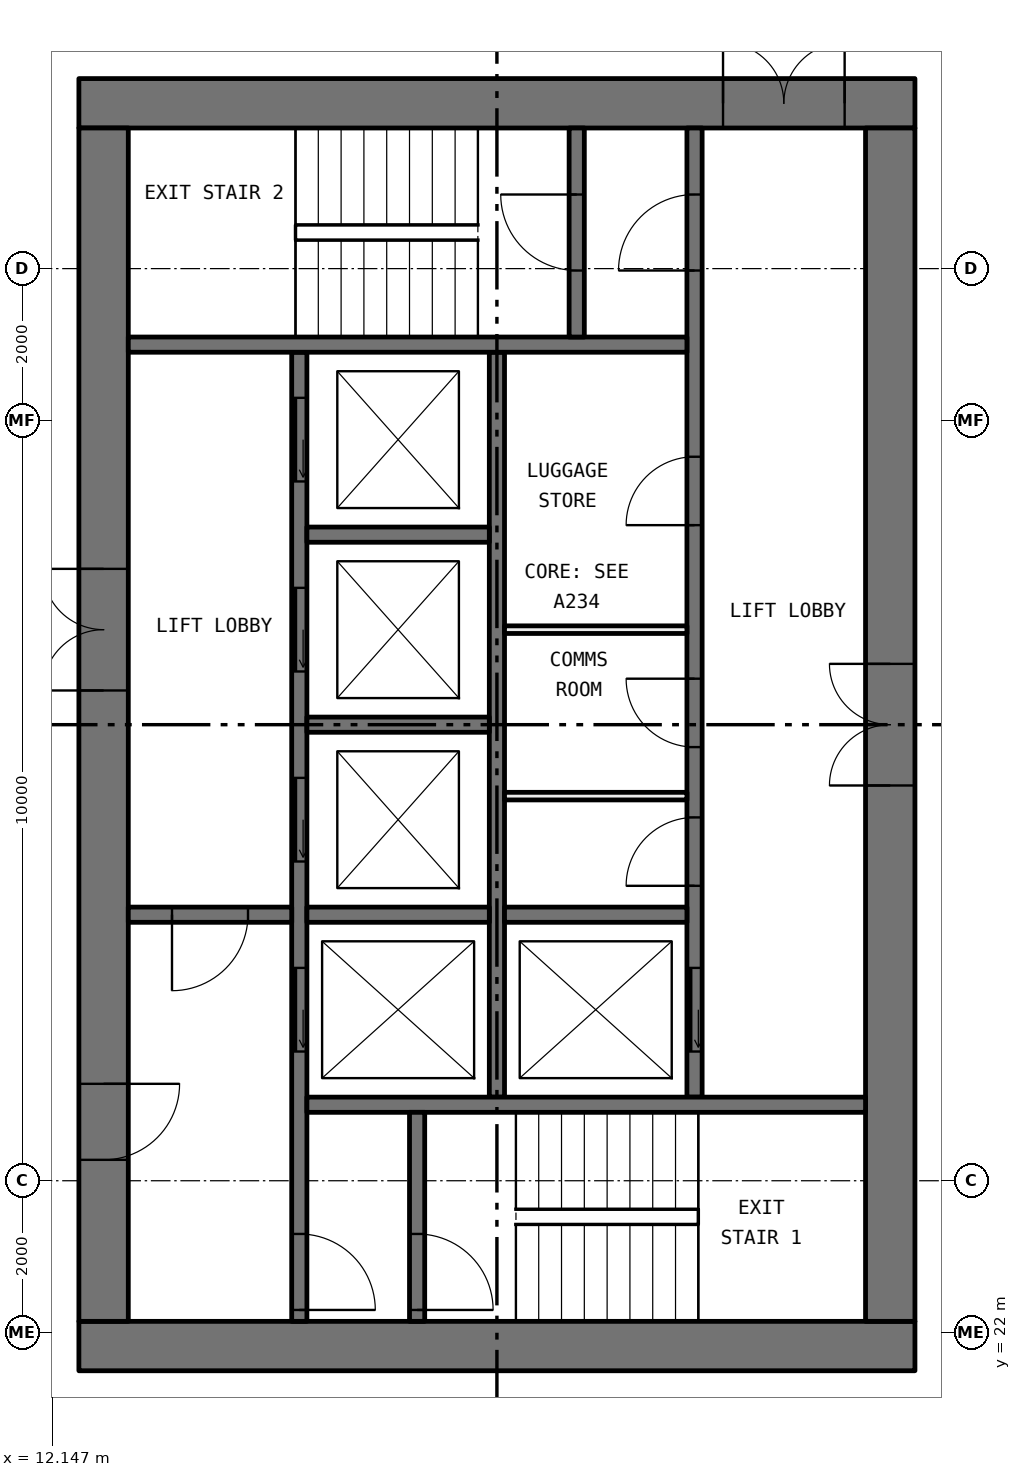
"""IFC4 building model, lengths in metres.
Left out: names, types, materials, properties, quantities, classifications, styles, units other than length and angle.
Written with IfcOpenShell. Run it as: python <this file> out.ifc"""

import sys

from ifc_helpers import new_model, si_unit, direction, frame, frame_2d, origin, place, context, subcontext, project, spatial, rectangle, extrude, element, fill, save


model = new_model("IFC4")
c1 = context("Model", 3, precision=1e-05, world=origin(), true_north=direction((0.0, 1.0)))
c2 = subcontext(c1, "Body", "Model", "MODEL_VIEW")
j1 = project(units=[si_unit("LENGTHUNIT", "METRE"), si_unit("PLANEANGLEUNIT", "RADIAN")], contexts=[c1])
p1 = place(None, origin())
s1 = spatial("IfcSite", under=j1, at=p1, CompositionType="ELEMENT")
p2 = place(p1, origin())
s2 = spatial("IfcBuilding", under=s1, at=p2, CompositionType="ELEMENT")
p3 = place(p2, frame((0.0, 0.0, 127.65)))
s3 = spatial("IfcBuildingStorey", under=s2, at=p3, CompositionType="ELEMENT", Elevation=127.65)
p4 = place(p3, frame((12.5, 21.825, 0.0), z_axis=(0.0, 0.0, 1.0), x_axis=(1.0, 0.0, 0.0)))
e1 = element("IfcWall", 1, at=p4, inside=s3, PredefinedType="SHEAR", context=c2, shape_type="SweptSolid", body=[
    extrude(rectangle(XDim=11.0, YDim=0.65, at=frame_2d((5.5, 0.0))), origin(), (0.0, 0.0, 1.0), 3.05),
])
p5 = place(p3, frame((12.5, 38.175, 0.0), z_axis=(0.0, 0.0, 1.0), x_axis=(1.0, 0.0, 0.0)))
e2 = element("IfcWall", 2, at=p5, inside=s3, PredefinedType="SHEAR", context=c2, shape_type="SweptSolid", body=[
    extrude(rectangle(XDim=11.0, YDim=0.65, at=frame_2d((5.5, 0.0))), origin(), (0.0, 0.0, 1.0), 3.05),
])
p6 = place(p5, frame((8.475, 0.0, 0.0)))
e3 = element("IfcOpeningElement", 3, at=p6, cuts=e2, PredefinedType="OPENING", context=c2, shape_type="SweptSolid", body=[
    extrude(rectangle(XDim=1.6, YDim=2.1, at=frame_2d((0.8, 1.05))), frame((0.0, 0.335, 0.0), z_axis=(0.0, -1.0, 0.0), x_axis=(1.0, 0.0, 0.0)), (0.0, 0.0, 1.0), 0.67),
])
p7 = place(p3, frame((12.825, 22.15, 0.0), z_axis=(0.0, 0.0, 1.0), x_axis=(0.0, 1.0, 0.0)))
e4 = element("IfcWall", 4, at=p7, inside=s3, PredefinedType="SHEAR", context=c2, shape_type="SweptSolid", body=[
    extrude(rectangle(XDim=15.7, YDim=0.65, at=frame_2d((7.85, 0.0))), origin(), (0.0, 0.0, 1.0), 3.05),
])
p8 = place(p7, frame((8.3, 0.0, 0.0)))
e5 = element("IfcOpeningElement", 5, at=p8, cuts=e4, PredefinedType="OPENING", context=c2, shape_type="SweptSolid", body=[
    extrude(rectangle(XDim=1.6, YDim=2.1, at=frame_2d((0.8, 1.05))), frame((0.0, 0.335, 0.0), z_axis=(0.0, -1.0, 0.0), x_axis=(1.0, 0.0, 0.0)), (0.0, 0.0, 1.0), 0.67),
])
p9 = place(p7, frame((2.125, 0.0, 0.0)))
e6 = element("IfcOpeningElement", 6, at=p9, cuts=e4, PredefinedType="OPENING", context=c2, shape_type="SweptSolid", body=[
    extrude(rectangle(XDim=1.0, YDim=2.1, at=frame_2d((0.5, 1.05))), frame((0.0, 0.335, 0.0), z_axis=(0.0, -1.0, 0.0), x_axis=(1.0, 0.0, 0.0)), (0.0, 0.0, 1.0), 0.67),
])
p10 = place(p3, frame((23.175, 22.15, 0.0), z_axis=(0.0, 0.0, 1.0), x_axis=(0.0, 1.0, 0.0)))
e7 = element("IfcWall", 7, at=p10, inside=s3, PredefinedType="SHEAR", context=c2, shape_type="SweptSolid", body=[
    extrude(rectangle(XDim=15.7, YDim=0.65, at=frame_2d((7.85, 0.0))), origin(), (0.0, 0.0, 1.0), 3.05),
])
p11 = place(p10, frame((7.05, 0.0, 0.0)))
e8 = element("IfcOpeningElement", 8, at=p11, cuts=e7, PredefinedType="OPENING", context=c2, shape_type="SweptSolid", body=[
    extrude(rectangle(XDim=1.6, YDim=2.1, at=frame_2d((0.8, 1.05))), frame((0.0, 0.335, 0.0), z_axis=(0.0, -1.0, 0.0), x_axis=(1.0, 0.0, 0.0)), (0.0, 0.0, 1.0), 0.67),
])
p12 = place(p3, frame((15.4, 22.15, 0.0), z_axis=(0.0, 0.0, 1.0), x_axis=(0.0, 1.0, 0.0)))
e9 = element("IfcWall", 9, at=p12, inside=s3, PredefinedType="SOLIDWALL", context=c2, shape_type="SweptSolid", body=[
    extrude(rectangle(XDim=12.75, YDim=0.2, at=frame_2d((6.375, 0.0))), origin(), (0.0, 0.0, 1.0), 3.05),
])
p13 = place(p12, frame((3.55, 0.0, 0.0)))
e10 = element("IfcOpeningElement", 10, at=p13, cuts=e9, PredefinedType="OPENING", context=c2, shape_type="SweptSolid", body=[
    extrude(rectangle(XDim=1.1, YDim=2.1, at=frame_2d((0.55, 1.05))), frame((0.0, 0.11, 0.0), z_axis=(0.0, -1.0, 0.0), x_axis=(1.0, 0.0, 0.0)), (0.0, 0.0, 1.0), 0.22),
])
p14 = place(p12, frame((6.05, 0.0, 0.0)))
e11 = element("IfcOpeningElement", 11, at=p14, cuts=e9, PredefinedType="OPENING", context=c2, shape_type="SweptSolid", body=[
    extrude(rectangle(XDim=1.1, YDim=2.1, at=frame_2d((0.55, 1.05))), frame((0.0, 0.11, 0.0), z_axis=(0.0, -1.0, 0.0), x_axis=(1.0, 0.0, 0.0)), (0.0, 0.0, 1.0), 0.22),
])
p15 = place(p12, frame((8.55, 0.0, 0.0)))
e12 = element("IfcOpeningElement", 12, at=p15, cuts=e9, PredefinedType="OPENING", context=c2, shape_type="SweptSolid", body=[
    extrude(rectangle(XDim=1.1, YDim=2.1, at=frame_2d((0.55, 1.05))), frame((0.0, 0.11, 0.0), z_axis=(0.0, -1.0, 0.0), x_axis=(1.0, 0.0, 0.0)), (0.0, 0.0, 1.0), 0.22),
])
p16 = place(p12, frame((11.05, 0.0, 0.0)))
e13 = element("IfcOpeningElement", 13, at=p16, cuts=e9, PredefinedType="OPENING", context=c2, shape_type="SweptSolid", body=[
    extrude(rectangle(XDim=1.1, YDim=2.1, at=frame_2d((0.55, 1.05))), frame((0.0, 0.11, 0.0), z_axis=(0.0, -1.0, 0.0), x_axis=(1.0, 0.0, 0.0)), (0.0, 0.0, 1.0), 0.22),
])
p17 = place(p12, frame((0.15, 0.0, 0.0)))
e14 = element("IfcOpeningElement", 14, at=p17, cuts=e9, PredefinedType="OPENING", context=c2, shape_type="SweptSolid", body=[
    extrude(rectangle(XDim=1.0, YDim=2.1, at=frame_2d((0.5, 1.05))), frame((0.0, 0.11, 0.0), z_axis=(0.0, -1.0, 0.0), x_axis=(1.0, 0.0, 0.0)), (0.0, 0.0, 1.0), 0.22),
])
p18 = place(p3, frame((20.6, 25.1, 0.0), z_axis=(0.0, 0.0, 1.0), x_axis=(0.0, 1.0, 0.0)))
e15 = element("IfcWall", 15, at=p18, inside=s3, PredefinedType="SOLIDWALL", context=c2, shape_type="SweptSolid", body=[
    extrude(rectangle(XDim=12.75, YDim=0.2, at=frame_2d((6.375, 0.0))), origin(), (0.0, 0.0, 1.0), 3.05),
])
p19 = place(p18, frame((0.6, 0.0, 0.0)))
e16 = element("IfcOpeningElement", 16, at=p19, cuts=e15, PredefinedType="OPENING", context=c2, shape_type="SweptSolid", body=[
    extrude(rectangle(XDim=1.1, YDim=2.1, at=frame_2d((0.55, 1.05))), frame((0.0, 0.11, 0.0), z_axis=(0.0, -1.0, 0.0), x_axis=(1.0, 0.0, 0.0)), (0.0, 0.0, 1.0), 0.22),
])
p20 = place(p18, frame((10.875, 0.0, 0.0)))
e17 = element("IfcOpeningElement", 17, at=p20, cuts=e15, PredefinedType="OPENING", context=c2, shape_type="SweptSolid", body=[
    extrude(rectangle(XDim=1.0, YDim=2.1, at=frame_2d((0.5, 1.05))), frame((0.0, 0.11, 0.0), z_axis=(0.0, -1.0, 0.0), x_axis=(1.0, 0.0, 0.0)), (0.0, 0.0, 1.0), 0.22),
])
p21 = place(p18, frame((2.78, 0.0, 0.0)))
e18 = element("IfcOpeningElement", 18, at=p21, cuts=e15, PredefinedType="OPENING", context=c2, shape_type="SweptSolid", body=[
    extrude(rectangle(XDim=0.9, YDim=2.1, at=frame_2d((0.45, 1.05))), frame((0.0, 0.11, 0.0), z_axis=(0.0, -1.0, 0.0), x_axis=(1.0, 0.0, 0.0)), (0.0, 0.0, 1.0), 0.22),
])
p22 = place(p18, frame((4.605, 0.0, 0.0)))
e19 = element("IfcOpeningElement", 19, at=p22, cuts=e15, PredefinedType="OPENING", context=c2, shape_type="SweptSolid", body=[
    extrude(rectangle(XDim=0.9, YDim=2.1, at=frame_2d((0.45, 1.05))), frame((0.0, 0.11, 0.0), z_axis=(0.0, -1.0, 0.0), x_axis=(1.0, 0.0, 0.0)), (0.0, 0.0, 1.0), 0.22),
])
p23 = place(p18, frame((7.525, 0.0, 0.0)))
e20 = element("IfcOpeningElement", 20, at=p23, cuts=e15, PredefinedType="OPENING", context=c2, shape_type="SweptSolid", body=[
    extrude(rectangle(XDim=0.9, YDim=2.1, at=frame_2d((0.45, 1.05))), frame((0.0, 0.11, 0.0), z_axis=(0.0, -1.0, 0.0), x_axis=(1.0, 0.0, 0.0)), (0.0, 0.0, 1.0), 0.22),
])
p24 = place(p3, frame((18.0, 25.1, 0.0), z_axis=(0.0, 0.0, 1.0), x_axis=(0.0, 1.0, 0.0)))
e21 = element("IfcWall", 21, at=p24, inside=s3, PredefinedType="SOLIDWALL", context=c2, shape_type="SweptSolid", body=[
    extrude(rectangle(XDim=9.8, YDim=0.2, at=frame_2d((4.9, 0.0))), origin(), (0.0, 0.0, 1.0), 3.05),
])
for number, where, z_axis, x_axis in (
    (22, (15.5, 25.0, 0.0), (0.0, 0.0, 1.0), (1.0, 0.0, 0.0)),
    (23, (13.15, 35.0, 0.0), (0.0, 0.0, 1.0), (1.0, 0.0, 0.0)),
):
    element("IfcWall", number, at=place(p3, frame(where, z_axis=z_axis, x_axis=x_axis)), inside=s3, PredefinedType="SOLIDWALL", context=c2, shape_type="SweptSolid", body=[
        extrude(rectangle(XDim=7.35, YDim=0.2, at=frame_2d((3.675, 0.0))), origin(), (0.0, 0.0, 1.0), 3.05),
    ])
p25 = place(p3, frame((13.15, 27.5, 0.0), z_axis=(0.0, 0.0, 1.0), x_axis=(1.0, 0.0, 0.0)))
e24 = element("IfcWall", 24, at=p25, inside=s3, PredefinedType="SOLIDWALL", context=c2, shape_type="SweptSolid", body=[
    extrude(rectangle(XDim=2.15, YDim=0.2, at=frame_2d((1.075, 0.0))), origin(), (0.0, 0.0, 1.0), 3.05),
])
p26 = place(p25, frame((0.575, 0.0, 0.0)))
e25 = element("IfcOpeningElement", 25, at=p26, cuts=e24, PredefinedType="OPENING", context=c2, shape_type="SweptSolid", body=[
    extrude(rectangle(XDim=1.0, YDim=2.1, at=frame_2d((0.5, 1.05))), frame((0.0, 0.11, 0.0), z_axis=(0.0, -1.0, 0.0), x_axis=(1.0, 0.0, 0.0)), (0.0, 0.0, 1.0), 0.22),
])
p27 = place(p3, frame((16.95, 22.15, 0.0), z_axis=(0.0, 0.0, 1.0), x_axis=(0.0, 1.0, 0.0)))
e26 = element("IfcWall", 26, at=p27, inside=s3, PredefinedType="SOLIDWALL", context=c2, shape_type="SweptSolid", body=[
    extrude(rectangle(XDim=2.75, YDim=0.2, at=frame_2d((1.375, 0.0))), origin(), (0.0, 0.0, 1.0), 3.05),
])
p28 = place(p27, frame((0.15, 0.0, 0.0)))
e27 = element("IfcOpeningElement", 27, at=p28, cuts=e26, PredefinedType="OPENING", context=c2, shape_type="SweptSolid", body=[
    extrude(rectangle(XDim=1.0, YDim=2.1, at=frame_2d((0.5, 1.05))), frame((0.0, 0.11, 0.0), z_axis=(0.0, -1.0, 0.0), x_axis=(1.0, 0.0, 0.0)), (0.0, 0.0, 1.0), 0.22),
])
p29 = place(p3, frame((19.05, 35.1, 0.0), z_axis=(0.0, 0.0, 1.0), x_axis=(0.0, 1.0, 0.0)))
e28 = element("IfcWall", 28, at=p29, inside=s3, PredefinedType="SOLIDWALL", context=c2, shape_type="SweptSolid", body=[
    extrude(rectangle(XDim=2.75, YDim=0.2, at=frame_2d((1.375, 0.0))), origin(), (0.0, 0.0, 1.0), 3.05),
])
p30 = place(p29, frame((0.875, 0.0, 0.0)))
e29 = element("IfcOpeningElement", 29, at=p30, cuts=e28, PredefinedType="OPENING", context=c2, shape_type="SweptSolid", body=[
    extrude(rectangle(XDim=1.0, YDim=2.1, at=frame_2d((0.5, 1.05))), frame((0.0, 0.11, 0.0), z_axis=(0.0, -1.0, 0.0), x_axis=(1.0, 0.0, 0.0)), (0.0, 0.0, 1.0), 0.22),
])
for number, where, z_axis, x_axis in (
    (30, (15.5, 27.5, 0.0), (0.0, 0.0, 1.0), (1.0, 0.0, 0.0)),
    (31, (15.5, 30.0, 0.0), (0.0, 0.0, 1.0), (1.0, 0.0, 0.0)),
    (32, (15.5, 32.5, 0.0), (0.0, 0.0, 1.0), (1.0, 0.0, 0.0)),
    (33, (18.1, 27.5, 0.0), (0.0, 0.0, 1.0), (1.0, 0.0, 0.0)),
):
    element("IfcWall", number, at=place(p3, frame(where, z_axis=z_axis, x_axis=x_axis)), inside=s3, PredefinedType="SOLIDWALL", context=c2, shape_type="SweptSolid", body=[
        extrude(rectangle(XDim=2.4, YDim=0.2, at=frame_2d((1.2, 0.0))), origin(), (0.0, 0.0, 1.0), 3.05),
    ])
for number, where, z_axis, x_axis in (
    (34, (18.1, 29.06, 0.0), (0.0, 0.0, 1.0), (1.0, 0.0, 0.0)),
    (35, (18.1, 31.25, 0.0), (0.0, 0.0, 1.0), (1.0, 0.0, 0.0)),
):
    element("IfcWall", number, at=place(p3, frame(where, z_axis=z_axis, x_axis=x_axis)), inside=s3, PredefinedType="PARTITIONING", context=c2, shape_type="SweptSolid", body=[
        extrude(rectangle(XDim=2.4, YDim=0.1, at=frame_2d((1.2, 0.0))), origin(), (0.0, 0.0, 1.0), 3.05),
    ])
p31 = place(p19, origin())
e36 = element("IfcDoor", 36, at=p31, inside=s3, OperationType="SLIDING_TO_LEFT", PredefinedType="DOOR", context=c2, shape_type="SweptSolid", body=[
    extrude(rectangle(XDim=1.1, YDim=2.1, at=frame_2d((0.55, 1.05))), frame((0.0, 0.025, 0.0), z_axis=(0.0, -1.0, 0.0), x_axis=(1.0, 0.0, 0.0)), (0.0, 0.0, 1.0), 0.05),
])
fill(e16, e36)
p32 = place(p13, origin())
e37 = element("IfcDoor", 37, at=p32, inside=s3, OperationType="SLIDING_TO_LEFT", PredefinedType="DOOR", context=c2, shape_type="SweptSolid", body=[
    extrude(rectangle(XDim=1.1, YDim=2.1, at=frame_2d((0.55, 1.05))), frame((0.0, 0.025, 0.0), z_axis=(0.0, -1.0, 0.0), x_axis=(1.0, 0.0, 0.0)), (0.0, 0.0, 1.0), 0.05),
])
fill(e10, e37)
p33 = place(p14, origin())
e38 = element("IfcDoor", 38, at=p33, inside=s3, OperationType="SLIDING_TO_LEFT", PredefinedType="DOOR", context=c2, shape_type="SweptSolid", body=[
    extrude(rectangle(XDim=1.1, YDim=2.1, at=frame_2d((0.55, 1.05))), frame((0.0, 0.025, 0.0), z_axis=(0.0, -1.0, 0.0), x_axis=(1.0, 0.0, 0.0)), (0.0, 0.0, 1.0), 0.05),
])
fill(e11, e38)
p34 = place(p15, origin())
e39 = element("IfcDoor", 39, at=p34, inside=s3, OperationType="SLIDING_TO_LEFT", PredefinedType="DOOR", context=c2, shape_type="SweptSolid", body=[
    extrude(rectangle(XDim=1.1, YDim=2.1, at=frame_2d((0.55, 1.05))), frame((0.0, 0.025, 0.0), z_axis=(0.0, -1.0, 0.0), x_axis=(1.0, 0.0, 0.0)), (0.0, 0.0, 1.0), 0.05),
])
fill(e12, e39)
p35 = place(p16, origin())
e40 = element("IfcDoor", 40, at=p35, inside=s3, OperationType="SLIDING_TO_LEFT", PredefinedType="DOOR", context=c2, shape_type="SweptSolid", body=[
    extrude(rectangle(XDim=1.1, YDim=2.1, at=frame_2d((0.55, 1.05))), frame((0.0, 0.025, 0.0), z_axis=(0.0, -1.0, 0.0), x_axis=(1.0, 0.0, 0.0)), (0.0, 0.0, 1.0), 0.05),
])
fill(e13, e40)
p36 = place(p28, frame((1.0, 0.0, 0.0), x_axis=(-1.0, 0.0, 0.0)))
e41 = element("IfcDoor", 41, at=p36, inside=s3, OperationType="SINGLE_SWING_LEFT", PredefinedType="DOOR", context=c2, shape_type="SweptSolid", body=[
    extrude(rectangle(XDim=1.0, YDim=2.1, at=frame_2d((0.5, 1.05))), frame((0.0, 0.025, 0.0), z_axis=(0.0, -1.0, 0.0), x_axis=(1.0, 0.0, 0.0)), (0.0, 0.0, 1.0), 0.05),
])
fill(e27, e41)
p37 = place(p17, frame((1.0, 0.0, 0.0), x_axis=(-1.0, 0.0, 0.0)))
e42 = element("IfcDoor", 42, at=p37, inside=s3, OperationType="SINGLE_SWING_LEFT", PredefinedType="DOOR", context=c2, shape_type="SweptSolid", body=[
    extrude(rectangle(XDim=1.0, YDim=2.1, at=frame_2d((0.5, 1.05))), frame((0.0, 0.025, 0.0), z_axis=(0.0, -1.0, 0.0), x_axis=(1.0, 0.0, 0.0)), (0.0, 0.0, 1.0), 0.05),
])
fill(e14, e42)
p38 = place(p20, origin())
e43 = element("IfcDoor", 43, at=p38, inside=s3, OperationType="SINGLE_SWING_RIGHT", PredefinedType="DOOR", context=c2, shape_type="SweptSolid", body=[
    extrude(rectangle(XDim=1.0, YDim=2.1, at=frame_2d((0.5, 1.05))), frame((0.0, 0.025, 0.0), z_axis=(0.0, -1.0, 0.0), x_axis=(1.0, 0.0, 0.0)), (0.0, 0.0, 1.0), 0.05),
])
fill(e17, e43)
p39 = place(p30, origin())
e44 = element("IfcDoor", 44, at=p39, inside=s3, OperationType="SINGLE_SWING_LEFT", PredefinedType="DOOR", context=c2, shape_type="SweptSolid", body=[
    extrude(rectangle(XDim=1.0, YDim=2.1, at=frame_2d((0.5, 1.05))), frame((0.0, 0.025, 0.0), z_axis=(0.0, -1.0, 0.0), x_axis=(1.0, 0.0, 0.0)), (0.0, 0.0, 1.0), 0.05),
])
fill(e29, e44)
p40 = place(p26, frame((1.0, 0.0, 0.0), x_axis=(-1.0, 0.0, 0.0)))
e45 = element("IfcDoor", 45, at=p40, inside=s3, OperationType="SINGLE_SWING_LEFT", PredefinedType="DOOR", context=c2, shape_type="SweptSolid", body=[
    extrude(rectangle(XDim=1.0, YDim=2.1, at=frame_2d((0.5, 1.05))), frame((0.0, 0.025, 0.0), z_axis=(0.0, -1.0, 0.0), x_axis=(1.0, 0.0, 0.0)), (0.0, 0.0, 1.0), 0.05),
])
fill(e25, e45)
p41 = place(p8, origin())
e46 = element("IfcDoor", 46, at=p41, inside=s3, OperationType="DOUBLE_DOOR_SINGLE_SWING", PredefinedType="DOOR", context=c2, shape_type="SweptSolid", body=[
    extrude(rectangle(XDim=1.6, YDim=2.1, at=frame_2d((0.8, 1.05))), frame((0.0, 0.025, 0.0), z_axis=(0.0, -1.0, 0.0), x_axis=(1.0, 0.0, 0.0)), (0.0, 0.0, 1.0), 0.05),
])
fill(e5, e46)
p42 = place(p9, frame((1.0, 0.0, 0.0), x_axis=(-1.0, 0.0, 0.0)))
e47 = element("IfcDoor", 47, at=p42, inside=s3, OperationType="SINGLE_SWING_RIGHT", PredefinedType="DOOR", context=c2, shape_type="SweptSolid", body=[
    extrude(rectangle(XDim=1.0, YDim=2.1, at=frame_2d((0.5, 1.05))), frame((0.0, 0.025, 0.0), z_axis=(0.0, -1.0, 0.0), x_axis=(1.0, 0.0, 0.0)), (0.0, 0.0, 1.0), 0.05),
])
fill(e6, e47)
p43 = place(p6, origin())
e48 = element("IfcDoor", 48, at=p43, inside=s3, OperationType="DOUBLE_DOOR_SINGLE_SWING", PredefinedType="DOOR", context=c2, shape_type="SweptSolid", body=[
    extrude(rectangle(XDim=1.6, YDim=2.1, at=frame_2d((0.8, 1.05))), frame((0.0, 0.025, 0.0), z_axis=(0.0, -1.0, 0.0), x_axis=(1.0, 0.0, 0.0)), (0.0, 0.0, 1.0), 0.05),
])
fill(e3, e48)
p44 = place(p11, origin())
e49 = element("IfcDoor", 49, at=p44, inside=s3, OperationType="DOUBLE_DOOR_SINGLE_SWING", PredefinedType="DOOR", context=c2, shape_type="SweptSolid", body=[
    extrude(rectangle(XDim=1.6, YDim=2.1, at=frame_2d((0.8, 1.05))), frame((0.0, 0.025, 0.0), z_axis=(0.0, -1.0, 0.0), x_axis=(1.0, 0.0, 0.0)), (0.0, 0.0, 1.0), 0.05),
])
fill(e8, e49)
p45 = place(p21, origin())
e50 = element("IfcDoor", 50, at=p45, inside=s3, OperationType="SINGLE_SWING_RIGHT", PredefinedType="DOOR", context=c2, shape_type="SweptSolid", body=[
    extrude(rectangle(XDim=0.9, YDim=2.1, at=frame_2d((0.45, 1.05))), frame((0.0, 0.025, 0.0), z_axis=(0.0, -1.0, 0.0), x_axis=(1.0, 0.0, 0.0)), (0.0, 0.0, 1.0), 0.05),
])
fill(e18, e50)
p46 = place(p22, origin())
e51 = element("IfcDoor", 51, at=p46, inside=s3, OperationType="SINGLE_SWING_LEFT", PredefinedType="DOOR", context=c2, shape_type="SweptSolid", body=[
    extrude(rectangle(XDim=0.9, YDim=2.1, at=frame_2d((0.45, 1.05))), frame((0.0, 0.025, 0.0), z_axis=(0.0, -1.0, 0.0), x_axis=(1.0, 0.0, 0.0)), (0.0, 0.0, 1.0), 0.05),
])
fill(e19, e51)
p47 = place(p23, origin())
e52 = element("IfcDoor", 52, at=p47, inside=s3, OperationType="SINGLE_SWING_RIGHT", PredefinedType="DOOR", context=c2, shape_type="SweptSolid", body=[
    extrude(rectangle(XDim=0.9, YDim=2.1, at=frame_2d((0.45, 1.05))), frame((0.0, 0.025, 0.0), z_axis=(0.0, -1.0, 0.0), x_axis=(1.0, 0.0, 0.0)), (0.0, 0.0, 1.0), 0.05),
])
fill(e20, e52)
save(model, sys.argv[1])
